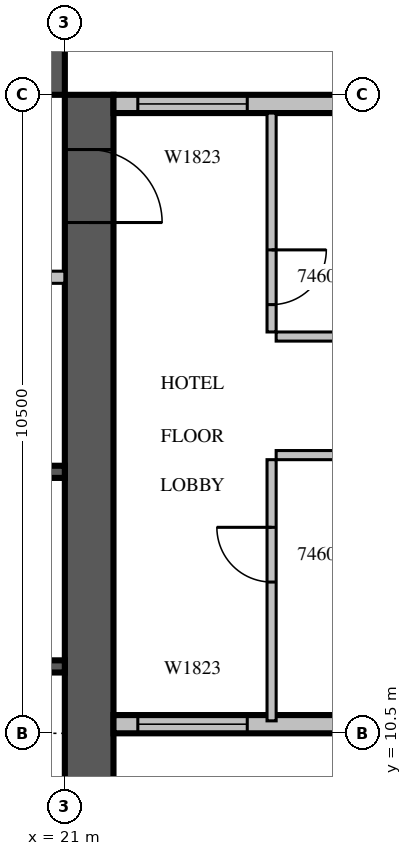
"""IFC4 building model, lengths in metres.
Left out: names, types, materials, properties, quantities, classifications, styles, units other than length and angle.
Written with IfcOpenShell. Run it as: python <this file> out.ifc"""

import sys

from ifc_helpers import new_model, si_unit, direction, frame, frame_2d, origin, place, context, subcontext, project, spatial, rectangle, extrude, source, transform, mapped, element, fill, save


model = new_model("IFC4")
c1 = context("Model", 3, precision=1e-05, world=origin(), true_north=direction((0.0, 1.0)))
c2 = subcontext(c1, "Body", "Model", "MODEL_VIEW")
j1 = project(units=[si_unit("LENGTHUNIT", "METRE"), si_unit("PLANEANGLEUNIT", "RADIAN")], contexts=[c1])
p1 = place(None, origin())
s1 = spatial("IfcSite", under=j1, at=p1, CompositionType="ELEMENT")
p2 = place(p1, origin())
s2 = spatial("IfcBuilding", under=s1, at=p2, CompositionType="ELEMENT")
p3 = place(p2, frame((0.0, 0.0, 208.2)))
s3 = spatial("IfcBuildingStorey", under=s2, at=p3, CompositionType="ELEMENT", Elevation=208.2)
m1 = source(origin(), c2, "Body", "SweptSolid", [
    extrude(rectangle(XDim=16.8, YDim=0.8, at=frame_2d((8.4, 0.0))), origin(), (0.0, 0.0, 1.0), 3.8),
])
p4 = place(p3, frame((21.4, 4.2, 0.0), z_axis=(0.0, 0.0, 1.0), x_axis=(0.0, 1.0, 0.0)))
e1 = element("IfcWall", 1, at=p4, inside=s3, PredefinedType="SHEAR", context=c2, shape_type="MappedRepresentation", body=[
    mapped(m1, transform((0.0, 0.0, 0.0), scale=1.0)),
])
m2 = source(origin(), c2, "Body", "SweptSolid", [
    extrude(rectangle(XDim=1.2, YDim=2.1, at=frame_2d((0.6, 1.05))), frame((0.0, 0.41, 0.0), z_axis=(0.0, -1.0, 0.0), x_axis=(1.0, 0.0, 0.0)), (0.0, 0.0, 1.0), 0.82),
])
p5 = place(p4, frame((14.7, 0.0, 0.0)))
e2 = element("IfcOpeningElement", 2, at=p5, cuts=e1, PredefinedType="OPENING", context=c2, shape_type="MappedRepresentation", body=[
    mapped(m2, transform((0.0, 0.0, 0.0), scale=1.0)),
])
p6 = place(p3, frame((4.2, 21.4, 0.0), z_axis=(0.0, 0.0, 1.0), x_axis=(1.0, 0.0, 0.0)))
e3 = element("IfcWall", 3, at=p6, inside=s3, PredefinedType="SHEAR", context=c2, shape_type="MappedRepresentation", body=[
    mapped(m1, transform((0.0, 0.0, 0.0), scale=1.0)),
])
p7 = place(p6, frame((6.2, 0.0, 0.0)))
e4 = element("IfcOpeningElement", 4, at=p7, cuts=e3, PredefinedType="OPENING", context=c2, shape_type="MappedRepresentation", body=[
    mapped(m2, transform((0.0, 0.0, 0.0), scale=1.0)),
])
m3 = source(origin(), c2, "Body", "SweptSolid", [
    extrude(rectangle(XDim=7.15, YDim=0.3, at=frame_2d((3.575, 0.0))), origin(), (0.0, 0.0, 1.0), 3.4),
])
p8 = place(p3, frame((21.8, 10.65, 0.0), z_axis=(0.0, 0.0, 1.0), x_axis=(1.0, 0.0, 0.0)))
e5 = element("IfcWall", 5, at=p8, inside=s3, PredefinedType="STANDARD", context=c2, shape_type="MappedRepresentation", body=[
    mapped(m3, transform((0.0, 0.0, 0.0), scale=1.0)),
])
m4 = source(origin(), c2, "Body", "SweptSolid", [
    extrude(rectangle(XDim=1.8, YDim=2.3, at=frame_2d((0.9, 1.15))), frame((0.0, 0.16, 0.0), z_axis=(0.0, -1.0, 0.0), x_axis=(1.0, 0.0, 0.0)), (0.0, 0.0, 1.0), 0.32),
])
p9 = place(p8, frame((0.4, 0.0, 0.6)))
e6 = element("IfcOpeningElement", 6, at=p9, cuts=e5, PredefinedType="OPENING", context=c2, shape_type="MappedRepresentation", body=[
    mapped(m4, transform((0.0, 0.0, 0.0), scale=1.0)),
])
m5 = source(origin(), c2, "Body", "SweptSolid", [
    extrude(rectangle(XDim=3.0, YDim=2.3, at=frame_2d((1.5, 1.15))), frame((0.0, 0.16, 0.0), z_axis=(0.0, -1.0, 0.0), x_axis=(1.0, 0.0, 0.0)), (0.0, 0.0, 1.0), 0.32),
])
p10 = place(p8, frame((4.0, 0.0, 0.6)))
e7 = element("IfcOpeningElement", 7, at=p10, cuts=e5, PredefinedType="OPENING", context=c2, shape_type="MappedRepresentation", body=[
    mapped(m5, transform((0.0, 0.0, 0.0), scale=1.0)),
])
p11 = place(p3, frame((28.95, 20.85, 0.0), z_axis=(0.0, 0.0, 1.0), x_axis=(-1.0, 0.0, 0.0)))
e8 = element("IfcWall", 8, at=p11, inside=s3, PredefinedType="STANDARD", context=c2, shape_type="MappedRepresentation", body=[
    mapped(m3, transform((0.0, 0.0, 0.0), scale=1.0)),
])
p12 = place(p11, frame((0.15, 0.0, 0.6)))
e9 = element("IfcOpeningElement", 9, at=p12, cuts=e8, PredefinedType="OPENING", context=c2, shape_type="MappedRepresentation", body=[
    mapped(m5, transform((0.0, 0.0, 0.0), scale=1.0)),
])
p13 = place(p11, frame((4.95, 0.0, 0.6)))
e10 = element("IfcOpeningElement", 10, at=p13, cuts=e8, PredefinedType="OPENING", context=c2, shape_type="MappedRepresentation", body=[
    mapped(m4, transform((0.0, 0.0, 0.0), scale=1.0)),
])
m6 = source(origin(), c2, "Body", "SweptSolid", [
    extrude(rectangle(XDim=9.6, YDim=0.2, at=frame_2d((4.8, 0.0))), origin(), (0.0, 0.0, 1.0), 3.8),
])
p14 = place(p3, frame((11.4, 11.6, 0.0), z_axis=(0.0, 0.0, 1.0), x_axis=(1.0, 0.0, 0.0)))
e11 = element("IfcWall", 11, at=p14, inside=s3, PredefinedType="SOLIDWALL", context=c2, shape_type="MappedRepresentation", body=[
    mapped(m6, transform((0.0, 0.0, 0.0), scale=1.0)),
])
p15 = place(p3, frame((11.4, 14.8, 0.0), z_axis=(0.0, 0.0, 1.0), x_axis=(1.0, 0.0, 0.0)))
e12 = element("IfcWall", 12, at=p15, inside=s3, PredefinedType="SOLIDWALL", context=c2, shape_type="MappedRepresentation", body=[
    mapped(m6, transform((0.0, 0.0, 0.0), scale=1.0)),
])
m7 = source(origin(), c2, "Body", "SweptSolid", [
    extrude(rectangle(XDim=1.1, YDim=2.1, at=frame_2d((0.55, 1.05))), frame((0.0, 0.11, 0.0), z_axis=(0.0, -1.0, 0.0), x_axis=(1.0, 0.0, 0.0)), (0.0, 0.0, 1.0), 0.22),
])
p16 = place(p15, frame((3.05, 0.0, 0.0)))
e13 = element("IfcOpeningElement", 13, at=p16, cuts=e12, PredefinedType="OPENING", context=c2, shape_type="MappedRepresentation", body=[
    mapped(m7, transform((0.0, 0.0, 0.0), scale=1.0)),
])
p17 = place(p15, frame((5.45, 0.0, 0.0)))
e14 = element("IfcOpeningElement", 14, at=p17, cuts=e12, PredefinedType="OPENING", context=c2, shape_type="MappedRepresentation", body=[
    mapped(m7, transform((0.0, 0.0, 0.0), scale=1.0)),
])
p18 = place(p15, frame((7.85, 0.0, 0.0)))
e15 = element("IfcOpeningElement", 15, at=p18, cuts=e12, PredefinedType="OPENING", context=c2, shape_type="MappedRepresentation", body=[
    mapped(m7, transform((0.0, 0.0, 0.0), scale=1.0)),
])
m8 = source(origin(), c2, "Body", "SweptSolid", [
    extrude(rectangle(XDim=11.45, YDim=0.2, at=frame_2d((5.725, 0.0))), origin(), (0.0, 0.0, 1.0), 3.4),
])
p19 = place(p3, frame((9.55, 18.0, 0.0), z_axis=(0.0, 0.0, 1.0), x_axis=(1.0, 0.0, 0.0)))
e16 = element("IfcWall", 16, at=p19, inside=s3, PredefinedType="PARTITIONING", context=c2, shape_type="MappedRepresentation", body=[
    mapped(m8, transform((0.0, 0.0, 0.0), scale=1.0)),
])
m9 = source(origin(), c2, "Body", "SweptSolid", [
    extrude(rectangle(XDim=0.9, YDim=2.1, at=frame_2d((0.45, 1.05))), frame((0.0, 0.11, 0.0), z_axis=(0.0, -1.0, 0.0), x_axis=(1.0, 0.0, 0.0)), (0.0, 0.0, 1.0), 0.22),
])
p20 = place(p19, frame((0.725, 0.0, 0.0)))
e17 = element("IfcOpeningElement", 17, at=p20, cuts=e16, PredefinedType="OPENING", context=c2, shape_type="MappedRepresentation", body=[
    mapped(m9, transform((0.0, 0.0, 0.0), scale=1.0)),
])
p21 = place(p19, frame((2.775, 0.0, 0.0)))
e18 = element("IfcOpeningElement", 18, at=p21, cuts=e16, PredefinedType="OPENING", context=c2, shape_type="MappedRepresentation", body=[
    mapped(m9, transform((0.0, 0.0, 0.0), scale=1.0)),
])
p22 = place(p19, frame((7.35, 0.0, 0.0)))
e19 = element("IfcOpeningElement", 19, at=p22, cuts=e16, PredefinedType="OPENING", context=c2, shape_type="MappedRepresentation", body=[
    mapped(m7, transform((0.0, 0.0, 0.0), scale=1.0)),
])
m10 = source(origin(), c2, "Body", "SweptSolid", [
    extrude(rectangle(XDim=4.295, YDim=0.15, at=frame_2d((2.147, 0.0))), origin(), (0.0, 0.0, 1.0), 3.4),
])
p23 = place(p3, frame((24.4, 15.0, 0.0), z_axis=(0.0, 0.0, 1.0), x_axis=(0.0, -1.0, 0.0)))
e20 = element("IfcWall", 20, at=p23, inside=s3, PredefinedType="PARTITIONING", context=c2, shape_type="MappedRepresentation", body=[
    mapped(m10, transform((0.0, 0.0, 0.0), scale=1.0)),
])
m11 = source(origin(), c2, "Body", "SweptSolid", [
    extrude(rectangle(XDim=0.9, YDim=2.1, at=frame_2d((0.45, 1.05))), frame((0.0, 0.085, 0.0), z_axis=(0.0, -1.0, 0.0), x_axis=(1.0, 0.0, 0.0)), (0.0, 0.0, 1.0), 0.17),
])
p24 = place(p23, frame((1.113, 0.0, 0.0)))
e21 = element("IfcOpeningElement", 21, at=p24, cuts=e20, PredefinedType="OPENING", context=c2, shape_type="MappedRepresentation", body=[
    mapped(m11, transform((0.0, 0.0, 0.0), scale=1.0)),
])
m12 = source(origin(), c2, "Body", "SweptSolid", [
    extrude(rectangle(XDim=3.6, YDim=0.15, at=frame_2d((1.8, 0.0))), origin(), (0.0, 0.0, 1.0), 3.4),
])
p25 = place(p3, frame((24.4, 20.7, 0.0), z_axis=(0.0, 0.0, 1.0), x_axis=(0.0, -1.0, 0.0)))
e22 = element("IfcWall", 22, at=p25, inside=s3, PredefinedType="PARTITIONING", context=c2, shape_type="MappedRepresentation", body=[
    mapped(m12, transform((0.0, 0.0, 0.0), scale=1.0)),
])
p26 = place(p25, frame((2.25, 0.0, 0.0)))
e23 = element("IfcOpeningElement", 23, at=p26, cuts=e22, PredefinedType="OPENING", context=c2, shape_type="MappedRepresentation", body=[
    mapped(m11, transform((0.0, 0.0, 0.0), scale=1.0)),
])
m13 = source(origin(), c2, "Body", "SweptSolid", [
    extrude(rectangle(XDim=4.85, YDim=0.15, at=frame_2d((2.425, 0.0))), origin(), (0.0, 0.0, 1.0), 3.4),
])
for number, where, z_axis, x_axis in (
    (24, (29.325, 15.075, 0.0), (0.0, 0.0, 1.0), (-1.0, 0.0, 0.0)),
    (25, (24.475, 17.025, 0.0), (0.0, 0.0, 1.0), (1.0, 0.0, 0.0)),
):
    element("IfcWall", number, at=place(p3, frame(where, z_axis=z_axis, x_axis=x_axis)), inside=s3, PredefinedType="PARTITIONING", context=c2, shape_type="MappedRepresentation", body=[
        mapped(m13, transform((0.0, 0.0, 0.0), scale=1.0)),
    ])
m14 = source(origin(), c2, "Body", "SweptSolid", [
    extrude(rectangle(XDim=1.8, YDim=2.3, at=frame_2d((0.9, 1.15))), frame((0.0, 0.03, 0.0), z_axis=(0.0, -1.0, 0.0), x_axis=(1.0, 0.0, 0.0)), (0.0, 0.0, 1.0), 0.06),
])
p27 = place(p9, origin())
e26 = element("IfcWindow", 26, at=p27, inside=s3, PartitioningType="SINGLE_PANEL", PredefinedType="WINDOW", context=c2, shape_type="MappedRepresentation", body=[
    mapped(m14, transform((0.0, 0.0, 0.0), scale=1.0)),
])
fill(e6, e26)
p28 = place(p13, origin())
e27 = element("IfcWindow", 27, at=p28, inside=s3, PartitioningType="SINGLE_PANEL", PredefinedType="WINDOW", context=c2, shape_type="MappedRepresentation", body=[
    mapped(m14, transform((0.0, 0.0, 0.0), scale=1.0)),
])
fill(e10, e27)
m15 = source(origin(), c2, "Body", "SweptSolid", [
    extrude(rectangle(XDim=1.2, YDim=2.1, at=frame_2d((0.6, 1.05))), frame((0.0, 0.025, 0.0), z_axis=(0.0, -1.0, 0.0), x_axis=(1.0, 0.0, 0.0)), (0.0, 0.0, 1.0), 0.05),
])
p29 = place(p5, origin())
e28 = element("IfcDoor", 28, at=p29, inside=s3, OperationType="SINGLE_SWING_RIGHT", PredefinedType="DOOR", context=c2, shape_type="MappedRepresentation", body=[
    mapped(m15, transform((0.0, 0.0, 0.0), scale=1.0)),
])
fill(e2, e28)
m16 = source(origin(), c2, "Body", "SweptSolid", [
    extrude(rectangle(XDim=0.9, YDim=2.1, at=frame_2d((0.45, 1.05))), frame((0.0, 0.025, 0.0), z_axis=(0.0, -1.0, 0.0), x_axis=(1.0, 0.0, 0.0)), (0.0, 0.0, 1.0), 0.05),
])
p30 = place(p24, origin())
e29 = element("IfcDoor", 29, at=p30, inside=s3, OperationType="SINGLE_SWING_RIGHT", PredefinedType="DOOR", context=c2, shape_type="MappedRepresentation", body=[
    mapped(m16, transform((0.0, 0.0, 0.0), scale=1.0)),
])
fill(e21, e29)
p31 = place(p26, origin())
e30 = element("IfcDoor", 30, at=p31, inside=s3, OperationType="SINGLE_SWING_LEFT", PredefinedType="DOOR", context=c2, shape_type="MappedRepresentation", body=[
    mapped(m16, transform((0.0, 0.0, 0.0), scale=1.0)),
])
fill(e23, e30)
save(model, sys.argv[1])
